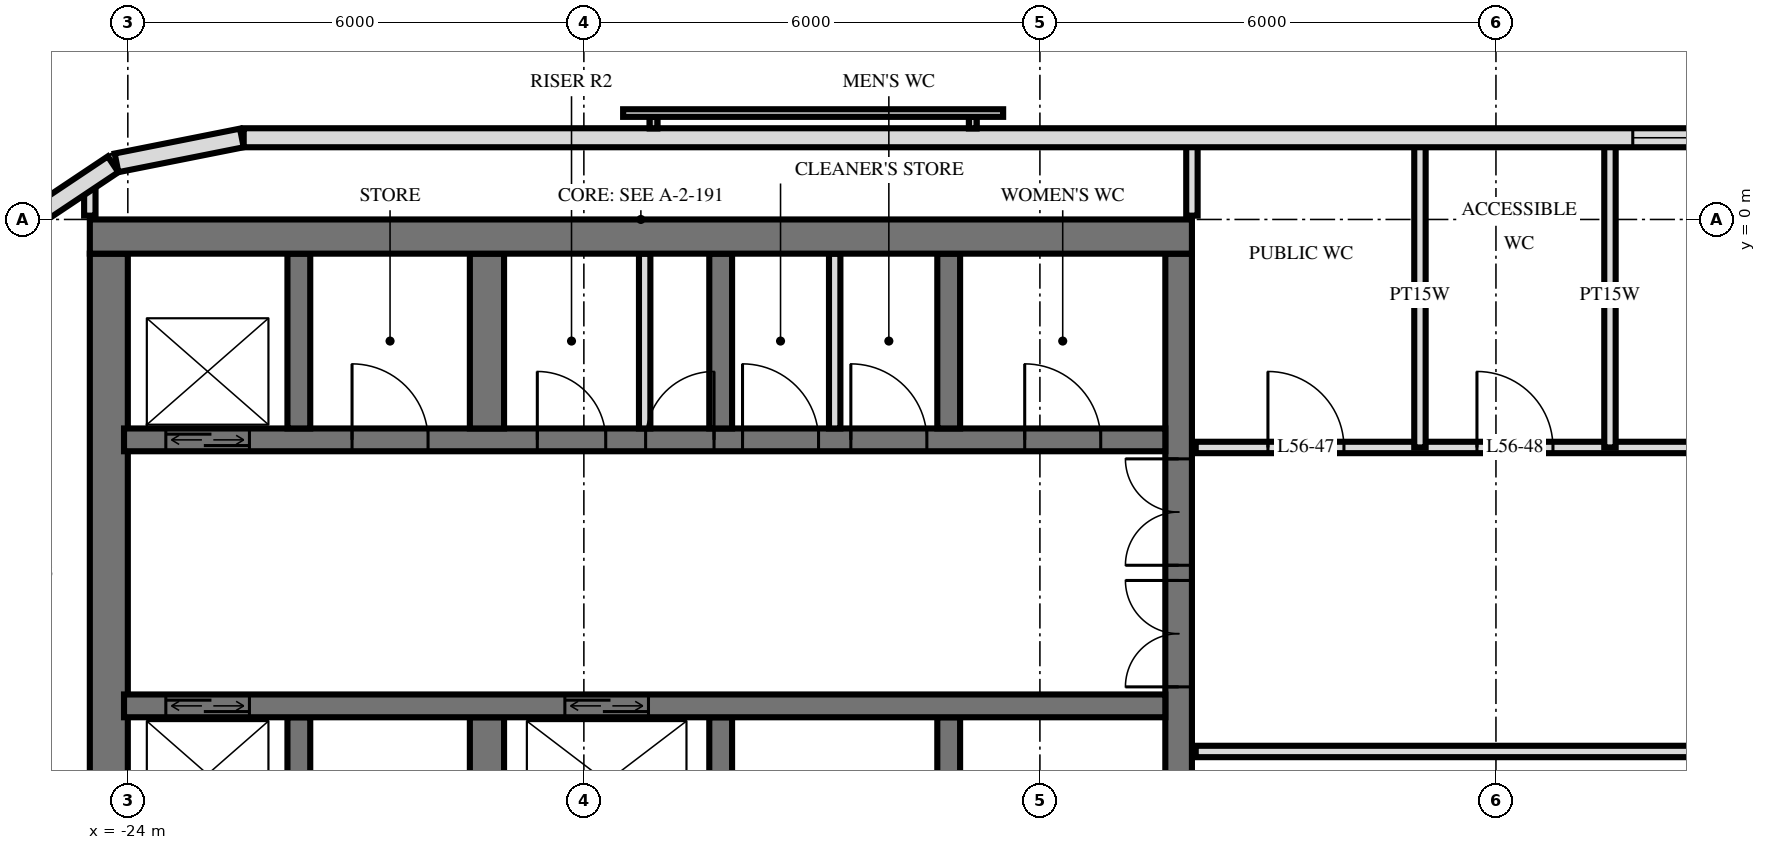
"""IFC4 building model, lengths in metres.
Left out: names, types, materials, properties, quantities, classifications, styles, units other than length and angle.
Written with IfcOpenShell. Run it as: python <this file> out.ifc"""

import sys

from ifc_helpers import new_model, si_unit, direction, frame, frame_2d, origin, place, context, subcontext, project, spatial, rectangle, extrude, element, fill, save


model = new_model("IFC4")
c1 = context("Model", 3, precision=1e-05, world=origin(), true_north=direction((0.0, 1.0)))
c2 = subcontext(c1, "Body", "Model", "MODEL_VIEW")
j1 = project(units=[si_unit("LENGTHUNIT", "METRE"), si_unit("PLANEANGLEUNIT", "RADIAN")], contexts=[c1])
p1 = place(None, origin())
s1 = spatial("IfcSite", under=j1, at=p1, CompositionType="ELEMENT")
p2 = place(p1, origin())
s2 = spatial("IfcBuilding", under=s1, at=p2, CompositionType="ELEMENT")
p3 = place(p2, frame((0.0, 0.0, 215.1)))
s3 = spatial("IfcBuildingStorey", under=s2, at=p3, CompositionType="ELEMENT", Elevation=215.1)
p4 = place(p3, frame((-24.5, -0.225, 0.0), z_axis=(0.0, 0.0, 1.0), x_axis=(1.0, 0.0, 0.0)))
e1 = element("IfcWall", 1, at=p4, inside=s3, PredefinedType="SHEAR", context=c2, shape_type="SweptSolid", body=[
    extrude(rectangle(XDim=14.5, YDim=0.45, at=frame_2d((7.25, 0.0))), origin(), (0.0, 0.0, 1.0), 3.5),
])
p5 = place(p3, frame((-10.175, -14.55, 0.0), z_axis=(0.0, 0.0, 1.0), x_axis=(0.0, 1.0, 0.0)))
e2 = element("IfcWall", 2, at=p5, inside=s3, PredefinedType="SHEAR", context=c2, shape_type="SweptSolid", body=[
    extrude(rectangle(XDim=14.1, YDim=0.35, at=frame_2d((7.05, 0.0))), origin(), (0.0, 0.0, 1.0), 3.5),
])
p6 = place(p5, frame((8.4, 0.0, 0.0)))
e3 = element("IfcOpeningElement", 3, at=p6, cuts=e2, PredefinedType="OPENING", context=c2, shape_type="SweptSolid", body=[
    extrude(rectangle(XDim=1.4, YDim=2.4, at=frame_2d((0.7, 1.2))), frame((0.0, 0.185, 0.0), z_axis=(0.0, -1.0, 0.0), x_axis=(1.0, 0.0, 0.0)), (0.0, 0.0, 1.0), 0.37),
])
p7 = place(p5, frame((10.0, 0.0, 0.0)))
e4 = element("IfcOpeningElement", 4, at=p7, cuts=e2, PredefinedType="OPENING", context=c2, shape_type="SweptSolid", body=[
    extrude(rectangle(XDim=1.4, YDim=2.4, at=frame_2d((0.7, 1.2))), frame((0.0, 0.185, 0.0), z_axis=(0.0, -1.0, 0.0), x_axis=(1.0, 0.0, 0.0)), (0.0, 0.0, 1.0), 0.37),
])
p8 = place(p5, frame((4.0, 0.0, 0.0)))
e5 = element("IfcOpeningElement", 5, at=p8, cuts=e2, PredefinedType="OPENING", context=c2, shape_type="SweptSolid", body=[
    extrude(rectangle(XDim=1.2, YDim=2.1, at=frame_2d((0.6, 1.05))), frame((0.0, 0.185, 0.0), z_axis=(0.0, -1.0, 0.0), x_axis=(1.0, 0.0, 0.0)), (0.0, 0.0, 1.0), 0.37),
])
p9 = place(p3, frame((-24.25, -14.55, 0.0), z_axis=(0.0, 0.0, 1.0), x_axis=(0.0, 1.0, 0.0)))
e6 = element("IfcWall", 6, at=p9, inside=s3, PredefinedType="SHEAR", context=c2, shape_type="SweptSolid", body=[
    extrude(rectangle(XDim=14.1, YDim=0.5, at=frame_2d((7.05, 0.0))), origin(), (0.0, 0.0, 1.0), 3.5),
])
p10 = place(p3, frame((-24.05, -2.9, 0.0), z_axis=(0.0, 0.0, 1.0), x_axis=(1.0, 0.0, 0.0)))
e7 = element("IfcWall", 7, at=p10, inside=s3, PredefinedType="SHEAR", context=c2, shape_type="SweptSolid", body=[
    extrude(rectangle(XDim=13.7, YDim=0.3, at=frame_2d((6.85, 0.0))), origin(), (0.0, 0.0, 1.0), 3.5),
])
p11 = place(p10, frame((0.55, 0.0, 0.0)))
e8 = element("IfcOpeningElement", 8, at=p11, cuts=e7, PredefinedType="OPENING", context=c2, shape_type="SweptSolid", body=[
    extrude(rectangle(XDim=1.1, YDim=2.1, at=frame_2d((0.55, 1.05))), frame((0.0, 0.16, 0.0), z_axis=(0.0, -1.0, 0.0), x_axis=(1.0, 0.0, 0.0)), (0.0, 0.0, 1.0), 0.32),
])
p12 = place(p10, frame((6.863, 0.0, 0.0)))
e9 = element("IfcOpeningElement", 9, at=p12, cuts=e7, PredefinedType="OPENING", context=c2, shape_type="SweptSolid", body=[
    extrude(rectangle(XDim=0.9, YDim=2.1, at=frame_2d((0.45, 1.05))), frame((0.0, 0.16, 0.0), z_axis=(0.0, -1.0, 0.0), x_axis=(1.0, 0.0, 0.0)), (0.0, 0.0, 1.0), 0.32),
])
p13 = place(p10, frame((5.438, 0.0, 0.0)))
e10 = element("IfcOpeningElement", 10, at=p13, cuts=e7, PredefinedType="OPENING", context=c2, shape_type="SweptSolid", body=[
    extrude(rectangle(XDim=0.9, YDim=2.1, at=frame_2d((0.45, 1.05))), frame((0.0, 0.16, 0.0), z_axis=(0.0, -1.0, 0.0), x_axis=(1.0, 0.0, 0.0)), (0.0, 0.0, 1.0), 0.32),
])
p14 = place(p10, frame((11.85, 0.0, 0.0)))
e11 = element("IfcOpeningElement", 11, at=p14, cuts=e7, PredefinedType="OPENING", context=c2, shape_type="SweptSolid", body=[
    extrude(rectangle(XDim=1.0, YDim=2.1, at=frame_2d((0.5, 1.05))), frame((0.0, 0.16, 0.0), z_axis=(0.0, -1.0, 0.0), x_axis=(1.0, 0.0, 0.0)), (0.0, 0.0, 1.0), 0.32),
])
p15 = place(p10, frame((9.562, 0.0, 0.0)))
e12 = element("IfcOpeningElement", 12, at=p15, cuts=e7, PredefinedType="OPENING", context=c2, shape_type="SweptSolid", body=[
    extrude(rectangle(XDim=1.0, YDim=2.1, at=frame_2d((0.5, 1.05))), frame((0.0, 0.16, 0.0), z_axis=(0.0, -1.0, 0.0), x_axis=(1.0, 0.0, 0.0)), (0.0, 0.0, 1.0), 0.32),
])
p16 = place(p10, frame((8.137, 0.0, 0.0)))
e13 = element("IfcOpeningElement", 13, at=p16, cuts=e7, PredefinedType="OPENING", context=c2, shape_type="SweptSolid", body=[
    extrude(rectangle(XDim=1.0, YDim=2.1, at=frame_2d((0.5, 1.05))), frame((0.0, 0.16, 0.0), z_axis=(0.0, -1.0, 0.0), x_axis=(1.0, 0.0, 0.0)), (0.0, 0.0, 1.0), 0.32),
])
p17 = place(p10, frame((3.0, 0.0, 0.0)))
e14 = element("IfcOpeningElement", 14, at=p17, cuts=e7, PredefinedType="OPENING", context=c2, shape_type="SweptSolid", body=[
    extrude(rectangle(XDim=1.0, YDim=2.1, at=frame_2d((0.5, 1.05))), frame((0.0, 0.16, 0.0), z_axis=(0.0, -1.0, 0.0), x_axis=(1.0, 0.0, 0.0)), (0.0, 0.0, 1.0), 0.32),
])
p18 = place(p3, frame((-24.05, -6.4, 0.0), z_axis=(0.0, 0.0, 1.0), x_axis=(1.0, 0.0, 0.0)))
e15 = element("IfcWall", 15, at=p18, inside=s3, PredefinedType="SHEAR", context=c2, shape_type="SweptSolid", body=[
    extrude(rectangle(XDim=13.7, YDim=0.3, at=frame_2d((6.85, 0.0))), origin(), (0.0, 0.0, 1.0), 3.5),
])
p19 = place(p18, frame((0.55, 0.0, 0.0)))
e16 = element("IfcOpeningElement", 16, at=p19, cuts=e15, PredefinedType="OPENING", context=c2, shape_type="SweptSolid", body=[
    extrude(rectangle(XDim=1.1, YDim=2.1, at=frame_2d((0.55, 1.05))), frame((0.0, 0.16, 0.0), z_axis=(0.0, -1.0, 0.0), x_axis=(1.0, 0.0, 0.0)), (0.0, 0.0, 1.0), 0.32),
])
p20 = place(p18, frame((5.8, 0.0, 0.0)))
e17 = element("IfcOpeningElement", 17, at=p20, cuts=e15, PredefinedType="OPENING", context=c2, shape_type="SweptSolid", body=[
    extrude(rectangle(XDim=1.1, YDim=2.1, at=frame_2d((0.55, 1.05))), frame((0.0, 0.16, 0.0), z_axis=(0.0, -1.0, 0.0), x_axis=(1.0, 0.0, 0.0)), (0.0, 0.0, 1.0), 0.32),
])
for number, where, z_axis, x_axis in (
    (18, (-13.2, -2.75, 0.0), (0.0, 0.0, 1.0), (0.0, 1.0, 0.0)),
    (19, (-13.2, -8.85, 0.0), (0.0, 0.0, 1.0), (0.0, 1.0, 0.0)),
    (20, (-16.2, -2.75, 0.0), (0.0, 0.0, 1.0), (0.0, 1.0, 0.0)),
    (21, (-16.2, -8.85, 0.0), (0.0, 0.0, 1.0), (0.0, 1.0, 0.0)),
):
    element("IfcWall", number, at=place(p3, frame(where, z_axis=z_axis, x_axis=x_axis)), inside=s3, PredefinedType="SHEAR", context=c2, shape_type="SweptSolid", body=[
        extrude(rectangle(XDim=2.3, YDim=0.3, at=frame_2d((1.15, 0.0))), origin(), (0.0, 0.0, 1.0), 3.5),
    ])
for number, where, z_axis, x_axis in (
    (22, (-19.275, -2.75, 0.0), (0.0, 0.0, 1.0), (0.0, 1.0, 0.0)),
    (23, (-19.275, -8.85, 0.0), (0.0, 0.0, 1.0), (0.0, 1.0, 0.0)),
):
    element("IfcWall", number, at=place(p3, frame(where, z_axis=z_axis, x_axis=x_axis)), inside=s3, PredefinedType="SHEAR", context=c2, shape_type="SweptSolid", body=[
        extrude(rectangle(XDim=2.3, YDim=0.45, at=frame_2d((1.15, 0.0))), origin(), (0.0, 0.0, 1.0), 3.5),
    ])
for number, where, z_axis, x_axis in (
    (24, (-21.75, -2.75, 0.0), (0.0, 0.0, 1.0), (0.0, 1.0, 0.0)),
    (25, (-21.75, -8.85, 0.0), (0.0, 0.0, 1.0), (0.0, 1.0, 0.0)),
):
    element("IfcWall", number, at=place(p3, frame(where, z_axis=z_axis, x_axis=x_axis)), inside=s3, PredefinedType="SHEAR", context=c2, shape_type="SweptSolid", body=[
        extrude(rectangle(XDim=2.3, YDim=0.3, at=frame_2d((1.15, 0.0))), origin(), (0.0, 0.0, 1.0), 3.5),
    ])
p21 = place(p3, frame((22.475, 1.075, 0.0), z_axis=(0.0, 0.0, 1.0), x_axis=(-1.0, 0.0, 0.0)))
e26 = element("IfcWall", 26, at=p21, inside=s3, PredefinedType="SOLIDWALL", context=c2, shape_type="SweptSolid", body=[
    extrude(rectangle(XDim=44.951, YDim=0.25, at=frame_2d((22.475, 0.0))), origin(), (0.0, 0.0, 1.0), 3.22),
])
p22 = place(p21, frame((15.275, 0.0, 0.9)))
e27 = element("IfcOpeningElement", 27, at=p22, cuts=e26, PredefinedType="OPENING", context=c2, shape_type="SweptSolid", body=[
    extrude(rectangle(XDim=2.4, YDim=1.5, at=frame_2d((1.2, 0.75))), frame((0.0, 0.135, 0.0), z_axis=(0.0, -1.0, 0.0), x_axis=(1.0, 0.0, 0.0)), (0.0, 0.0, 1.0), 0.27),
])
p23 = place(p21, frame((18.275, 0.0, 0.9)))
e28 = element("IfcOpeningElement", 28, at=p23, cuts=e26, PredefinedType="OPENING", context=c2, shape_type="SweptSolid", body=[
    extrude(rectangle(XDim=2.4, YDim=1.5, at=frame_2d((1.2, 0.75))), frame((0.0, 0.135, 0.0), z_axis=(0.0, -1.0, 0.0), x_axis=(1.0, 0.0, 0.0)), (0.0, 0.0, 1.0), 0.27),
])
p24 = place(p21, frame((21.275, 0.0, 0.9)))
e29 = element("IfcOpeningElement", 29, at=p24, cuts=e26, PredefinedType="OPENING", context=c2, shape_type="SweptSolid", body=[
    extrude(rectangle(XDim=2.4, YDim=1.5, at=frame_2d((1.2, 0.75))), frame((0.0, 0.135, 0.0), z_axis=(0.0, -1.0, 0.0), x_axis=(1.0, 0.0, 0.0)), (0.0, 0.0, 1.0), 0.27),
])
p25 = place(p21, frame((24.275, 0.0, 0.9)))
e30 = element("IfcOpeningElement", 30, at=p25, cuts=e26, PredefinedType="OPENING", context=c2, shape_type="SweptSolid", body=[
    extrude(rectangle(XDim=2.4, YDim=1.5, at=frame_2d((1.2, 0.75))), frame((0.0, 0.135, 0.0), z_axis=(0.0, -1.0, 0.0), x_axis=(1.0, 0.0, 0.0)), (0.0, 0.0, 1.0), 0.27),
])
p26 = place(p3, frame((-22.5, 1.073, 0.0), z_axis=(0.0, 0.0, 1.0), x_axis=(-0.980803419081, -0.194999110559, 0.0)))
e31 = element("IfcWall", 31, at=p26, inside=s3, PredefinedType="SOLIDWALL", context=c2, shape_type="SweptSolid", body=[
    extrude(rectangle(XDim=1.681, YDim=0.25, at=frame_2d((0.841, 0.0))), origin(), (0.0, 0.0, 1.0), 3.22),
])
p27 = place(p3, frame((-24.194, 0.726, 0.0), z_axis=(0.0, 0.0, 1.0), x_axis=(-0.831482937015, -0.55555029066, 0.0)))
e32 = element("IfcWall", 32, at=p27, inside=s3, PredefinedType="SOLIDWALL", context=c2, shape_type="SweptSolid", body=[
    extrude(rectangle(XDim=1.656, YDim=0.25, at=frame_2d((0.828, 0.0))), origin(), (0.0, 0.0, 1.0), 3.22),
])
for number, where, z_axis, x_axis in (
    (33, (-17.2, -2.75, 0.0), (0.0, 0.0, 1.0), (0.0, 1.0, 0.0)),
    (34, (-14.7, -2.75, 0.0), (0.0, 0.0, 1.0), (0.0, 1.0, 0.0)),
):
    element("IfcWall", number, at=place(p3, frame(where, z_axis=z_axis, x_axis=x_axis)), inside=s3, PredefinedType="PARTITIONING", context=c2, shape_type="SweptSolid", body=[
        extrude(rectangle(XDim=2.3, YDim=0.15, at=frame_2d((1.15, 0.0))), origin(), (0.0, 0.0, 1.0), 3.2),
    ])
for number, where, z_axis, x_axis in (
    (35, (-4.5, -3.0, 0.0), (0.0, 0.0, 1.0), (0.0, 1.0, 0.0)),
    (36, (-7.0, -3.0, 0.0), (0.0, 0.0, 1.0), (0.0, 1.0, 0.0)),
):
    element("IfcWall", number, at=place(p3, frame(where, z_axis=z_axis, x_axis=x_axis)), inside=s3, PredefinedType="PLUMBINGWALL", context=c2, shape_type="SweptSolid", body=[
        extrude(rectangle(XDim=4.02, YDim=0.15, at=frame_2d((2.01, 0.0))), origin(), (0.0, 0.0, 1.0), 3.22),
    ])
p28 = place(p3, frame((-10.0, 0.05, 0.0), z_axis=(0.0, 0.0, 1.0), x_axis=(0.0, 1.0, 0.0)))
e37 = element("IfcWall", 37, at=p28, inside=s3, PredefinedType="PLUMBINGWALL", context=c2, shape_type="SweptSolid", body=[
    extrude(rectangle(XDim=0.97, YDim=0.15, at=frame_2d((0.485, 0.0))), origin(), (0.0, 0.0, 1.0), 3.22),
])
p29 = place(p3, frame((-24.5, 0.05, 0.0), z_axis=(0.0, 0.0, 1.0), x_axis=(0.0, 1.0, 0.0)))
e38 = element("IfcWall", 38, at=p29, inside=s3, PredefinedType="PARTITIONING", context=c2, shape_type="SweptSolid", body=[
    extrude(rectangle(XDim=0.405, YDim=0.15, at=frame_2d((0.203, 0.0))), origin(), (0.0, 0.0, 1.0), 3.22),
])
p30 = place(p3, frame((-9.95, -7.0, 0.0), z_axis=(0.0, 0.0, 1.0), x_axis=(1.0, 0.0, 0.0)))
e39 = element("IfcWall", 39, at=p30, inside=s3, PredefinedType="PARTITIONING", context=c2, shape_type="SweptSolid", body=[
    extrude(rectangle(XDim=19.9, YDim=0.15, at=frame_2d((9.95, 0.0))), origin(), (0.0, 0.0, 1.0), 3.22),
])
p31 = place(p30, frame((9.45, 0.0, 0.0)))
e40 = element("IfcOpeningElement", 40, at=p31, cuts=e39, PredefinedType="OPENING", context=c2, shape_type="SweptSolid", body=[
    extrude(rectangle(XDim=1.0, YDim=2.1, at=frame_2d((0.5, 1.05))), frame((0.0, 0.085, 0.0), z_axis=(0.0, -1.0, 0.0), x_axis=(1.0, 0.0, 0.0)), (0.0, 0.0, 1.0), 0.17),
])
p32 = place(p30, frame((15.45, 0.0, 0.0)))
e41 = element("IfcOpeningElement", 41, at=p32, cuts=e39, PredefinedType="OPENING", context=c2, shape_type="SweptSolid", body=[
    extrude(rectangle(XDim=1.0, YDim=2.1, at=frame_2d((0.5, 1.05))), frame((0.0, 0.085, 0.0), z_axis=(0.0, -1.0, 0.0), x_axis=(1.0, 0.0, 0.0)), (0.0, 0.0, 1.0), 0.17),
])
p33 = place(p3, frame((-9.95, -3.0, 0.0), z_axis=(0.0, 0.0, 1.0), x_axis=(1.0, 0.0, 0.0)))
e42 = element("IfcWall", 42, at=p33, inside=s3, PredefinedType="PARTITIONING", context=c2, shape_type="SweptSolid", body=[
    extrude(rectangle(XDim=19.9, YDim=0.15, at=frame_2d((9.95, 0.0))), origin(), (0.0, 0.0, 1.0), 3.22),
])
p34 = place(p33, frame((0.95, 0.0, 0.0)))
e43 = element("IfcOpeningElement", 43, at=p34, cuts=e42, PredefinedType="OPENING", context=c2, shape_type="SweptSolid", body=[
    extrude(rectangle(XDim=1.0, YDim=2.1, at=frame_2d((0.5, 1.05))), frame((0.0, 0.085, 0.0), z_axis=(0.0, -1.0, 0.0), x_axis=(1.0, 0.0, 0.0)), (0.0, 0.0, 1.0), 0.17),
])
p35 = place(p33, frame((3.7, 0.0, 0.0)))
e44 = element("IfcOpeningElement", 44, at=p35, cuts=e42, PredefinedType="OPENING", context=c2, shape_type="SweptSolid", body=[
    extrude(rectangle(XDim=1.0, YDim=2.1, at=frame_2d((0.5, 1.05))), frame((0.0, 0.085, 0.0), z_axis=(0.0, -1.0, 0.0), x_axis=(1.0, 0.0, 0.0)), (0.0, 0.0, 1.0), 0.17),
])
p36 = place(p33, frame((7.95, 0.0, 0.0)))
e45 = element("IfcOpeningElement", 45, at=p36, cuts=e42, PredefinedType="OPENING", context=c2, shape_type="SweptSolid", body=[
    extrude(rectangle(XDim=1.0, YDim=2.1, at=frame_2d((0.5, 1.05))), frame((0.0, 0.085, 0.0), z_axis=(0.0, -1.0, 0.0), x_axis=(1.0, 0.0, 0.0)), (0.0, 0.0, 1.0), 0.17),
])
p37 = place(p33, frame((15.2, 0.0, 0.0)))
e46 = element("IfcOpeningElement", 46, at=p37, cuts=e42, PredefinedType="OPENING", context=c2, shape_type="SweptSolid", body=[
    extrude(rectangle(XDim=1.0, YDim=2.1, at=frame_2d((0.5, 1.05))), frame((0.0, 0.085, 0.0), z_axis=(0.0, -1.0, 0.0), x_axis=(1.0, 0.0, 0.0)), (0.0, 0.0, 1.0), 0.17),
])
p38 = place(p25, origin())
e47 = element("IfcWindow", 47, at=p38, inside=s3, PartitioningType="SINGLE_PANEL", PredefinedType="WINDOW", context=c2, shape_type="SweptSolid", body=[
    extrude(rectangle(XDim=2.4, YDim=1.5, at=frame_2d((1.2, 0.75))), frame((0.0, 0.03, 0.0), z_axis=(0.0, -1.0, 0.0), x_axis=(1.0, 0.0, 0.0)), (0.0, 0.0, 1.0), 0.06),
])
fill(e30, e47)
p39 = place(p11, origin())
e48 = element("IfcDoor", 48, at=p39, inside=s3, OperationType="DOUBLE_DOOR_SLIDING", PredefinedType="USERDEFINED", context=c2, shape_type="SweptSolid", body=[
    extrude(rectangle(XDim=1.1, YDim=2.1, at=frame_2d((0.55, 1.05))), frame((0.0, 0.025, 0.0), z_axis=(0.0, -1.0, 0.0), x_axis=(1.0, 0.0, 0.0)), (0.0, 0.0, 1.0), 0.05),
])
fill(e8, e48)
p40 = place(p19, origin())
e49 = element("IfcDoor", 49, at=p40, inside=s3, OperationType="DOUBLE_DOOR_SLIDING", PredefinedType="USERDEFINED", context=c2, shape_type="SweptSolid", body=[
    extrude(rectangle(XDim=1.1, YDim=2.1, at=frame_2d((0.55, 1.05))), frame((0.0, 0.025, 0.0), z_axis=(0.0, -1.0, 0.0), x_axis=(1.0, 0.0, 0.0)), (0.0, 0.0, 1.0), 0.05),
])
fill(e16, e49)
p41 = place(p20, origin())
e50 = element("IfcDoor", 50, at=p41, inside=s3, OperationType="DOUBLE_DOOR_SLIDING", PredefinedType="USERDEFINED", context=c2, shape_type="SweptSolid", body=[
    extrude(rectangle(XDim=1.1, YDim=2.1, at=frame_2d((0.55, 1.05))), frame((0.0, 0.025, 0.0), z_axis=(0.0, -1.0, 0.0), x_axis=(1.0, 0.0, 0.0)), (0.0, 0.0, 1.0), 0.05),
])
fill(e17, e50)
p42 = place(p6, origin())
e51 = element("IfcDoor", 51, at=p42, inside=s3, OperationType="DOUBLE_DOOR_SINGLE_SWING", PredefinedType="DOOR", context=c2, shape_type="SweptSolid", body=[
    extrude(rectangle(XDim=1.4, YDim=2.4, at=frame_2d((0.7, 1.2))), frame((0.0, 0.025, 0.0), z_axis=(0.0, -1.0, 0.0), x_axis=(1.0, 0.0, 0.0)), (0.0, 0.0, 1.0), 0.05),
])
fill(e3, e51)
p43 = place(p7, origin())
e52 = element("IfcDoor", 52, at=p43, inside=s3, OperationType="DOUBLE_DOOR_SINGLE_SWING", PredefinedType="DOOR", context=c2, shape_type="SweptSolid", body=[
    extrude(rectangle(XDim=1.4, YDim=2.4, at=frame_2d((0.7, 1.2))), frame((0.0, 0.025, 0.0), z_axis=(0.0, -1.0, 0.0), x_axis=(1.0, 0.0, 0.0)), (0.0, 0.0, 1.0), 0.05),
])
fill(e4, e52)
p44 = place(p12, origin())
e53 = element("IfcDoor", 53, at=p44, inside=s3, OperationType="SINGLE_SWING_LEFT", PredefinedType="DOOR", context=c2, shape_type="SweptSolid", body=[
    extrude(rectangle(XDim=0.9, YDim=2.1, at=frame_2d((0.45, 1.05))), frame((0.0, 0.025, 0.0), z_axis=(0.0, -1.0, 0.0), x_axis=(1.0, 0.0, 0.0)), (0.0, 0.0, 1.0), 0.05),
])
fill(e9, e53)
p45 = place(p13, origin())
e54 = element("IfcDoor", 54, at=p45, inside=s3, OperationType="SINGLE_SWING_RIGHT", PredefinedType="DOOR", context=c2, shape_type="SweptSolid", body=[
    extrude(rectangle(XDim=0.9, YDim=2.1, at=frame_2d((0.45, 1.05))), frame((0.0, 0.025, 0.0), z_axis=(0.0, -1.0, 0.0), x_axis=(1.0, 0.0, 0.0)), (0.0, 0.0, 1.0), 0.05),
])
fill(e10, e54)
p46 = place(p14, origin())
e55 = element("IfcDoor", 55, at=p46, inside=s3, OperationType="SINGLE_SWING_RIGHT", PredefinedType="DOOR", context=c2, shape_type="SweptSolid", body=[
    extrude(rectangle(XDim=1.0, YDim=2.1, at=frame_2d((0.5, 1.05))), frame((0.0, 0.025, 0.0), z_axis=(0.0, -1.0, 0.0), x_axis=(1.0, 0.0, 0.0)), (0.0, 0.0, 1.0), 0.05),
])
fill(e11, e55)
p47 = place(p15, origin())
e56 = element("IfcDoor", 56, at=p47, inside=s3, OperationType="SINGLE_SWING_RIGHT", PredefinedType="DOOR", context=c2, shape_type="SweptSolid", body=[
    extrude(rectangle(XDim=1.0, YDim=2.1, at=frame_2d((0.5, 1.05))), frame((0.0, 0.025, 0.0), z_axis=(0.0, -1.0, 0.0), x_axis=(1.0, 0.0, 0.0)), (0.0, 0.0, 1.0), 0.05),
])
fill(e12, e56)
p48 = place(p16, origin())
e57 = element("IfcDoor", 57, at=p48, inside=s3, OperationType="SINGLE_SWING_RIGHT", PredefinedType="DOOR", context=c2, shape_type="SweptSolid", body=[
    extrude(rectangle(XDim=1.0, YDim=2.1, at=frame_2d((0.5, 1.05))), frame((0.0, 0.025, 0.0), z_axis=(0.0, -1.0, 0.0), x_axis=(1.0, 0.0, 0.0)), (0.0, 0.0, 1.0), 0.05),
])
fill(e13, e57)
p49 = place(p17, origin())
e58 = element("IfcDoor", 58, at=p49, inside=s3, OperationType="SINGLE_SWING_RIGHT", PredefinedType="DOOR", context=c2, shape_type="SweptSolid", body=[
    extrude(rectangle(XDim=1.0, YDim=2.1, at=frame_2d((0.5, 1.05))), frame((0.0, 0.025, 0.0), z_axis=(0.0, -1.0, 0.0), x_axis=(1.0, 0.0, 0.0)), (0.0, 0.0, 1.0), 0.05),
])
fill(e14, e58)
p50 = place(p34, origin())
e59 = element("IfcDoor", 59, at=p50, inside=s3, OperationType="SINGLE_SWING_RIGHT", PredefinedType="DOOR", context=c2, shape_type="SweptSolid", body=[
    extrude(rectangle(XDim=1.0, YDim=2.1, at=frame_2d((0.5, 1.05))), frame((0.0, 0.025, 0.0), z_axis=(0.0, -1.0, 0.0), x_axis=(1.0, 0.0, 0.0)), (0.0, 0.0, 1.0), 0.05),
])
fill(e43, e59)
p51 = place(p35, origin())
e60 = element("IfcDoor", 60, at=p51, inside=s3, OperationType="SINGLE_SWING_RIGHT", PredefinedType="DOOR", context=c2, shape_type="SweptSolid", body=[
    extrude(rectangle(XDim=1.0, YDim=2.1, at=frame_2d((0.5, 1.05))), frame((0.0, 0.025, 0.0), z_axis=(0.0, -1.0, 0.0), x_axis=(1.0, 0.0, 0.0)), (0.0, 0.0, 1.0), 0.05),
])
fill(e44, e60)
save(model, sys.argv[1])
